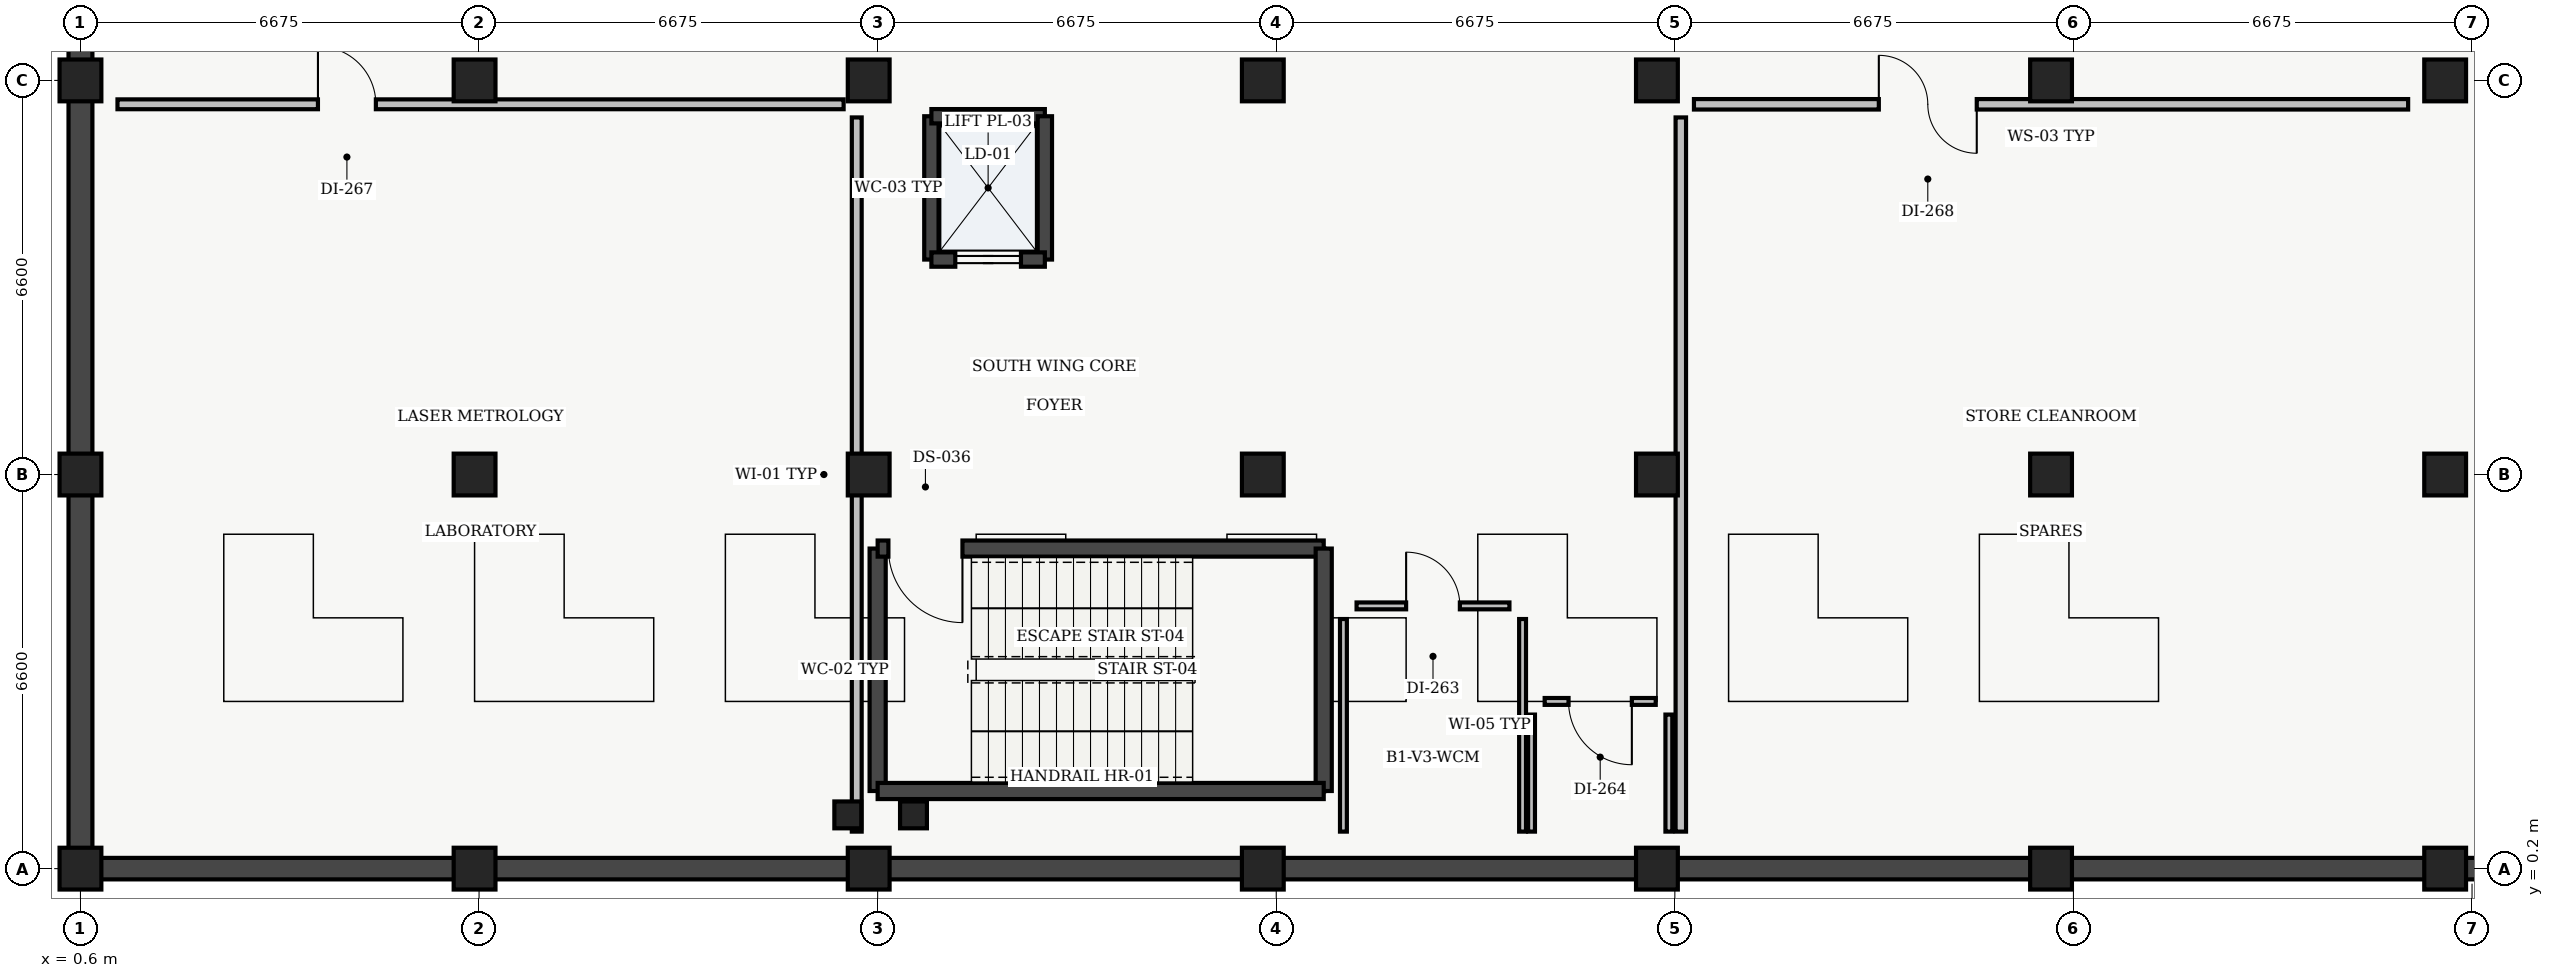
"""IFC4 building model, lengths in metres.
Left out: names, types, materials, properties, quantities, classifications, styles, units other than length and angle.
Written with IfcOpenShell. Run it as: python <this file> out.ifc"""

import sys

from ifc_helpers import new_model, si_unit, direction, frame, frame_2d, origin, origin_2d, place, context, subcontext, project, spatial, rectangle, extrude, element, fill, save


model = new_model("IFC4")
c1 = context("Model", 3, precision=1e-05, world=origin(), true_north=direction((0.0, 1.0)))
c2 = subcontext(c1, "Body", "Model", "MODEL_VIEW")
j1 = project(units=[si_unit("LENGTHUNIT", "METRE"), si_unit("PLANEANGLEUNIT", "RADIAN")], contexts=[c1])
p1 = place(None, origin())
s1 = spatial("IfcSite", under=j1, at=p1, CompositionType="ELEMENT")
p2 = place(p1, origin())
s2 = spatial("IfcBuilding", under=s1, at=p2, CompositionType="ELEMENT")
p3 = place(p2, frame((0.0, 0.0, -4.8)))
s3 = spatial("IfcBuildingStorey", under=s2, at=p3, CompositionType="ELEMENT", Elevation=-4.8)
for number, where, z_axis, x_axis in (
    (1, (0.6, 0.2, 0.0), (0.0, 0.0, 1.0), (1.0, 0.0, 0.0)),
    (2, (0.6, 6.8, 0.0), (0.0, 0.0, 1.0), (1.0, 0.0, 0.0)),
    (3, (0.6, 13.4, 0.0), (0.0, 0.0, 1.0), (1.0, 0.0, 0.0)),
    (4, (7.2, 0.2, 0.0), (0.0, 0.0, 1.0), (1.0, 0.0, 0.0)),
    (5, (7.2, 6.8, 0.0), (0.0, 0.0, 1.0), (1.0, 0.0, 0.0)),
    (6, (7.2, 13.4, 0.0), (0.0, 0.0, 1.0), (1.0, 0.0, 0.0)),
    (7, (13.8, 0.2, 0.0), (0.0, 0.0, 1.0), (1.0, 0.0, 0.0)),
    (8, (13.8, 6.8, 0.0), (0.0, 0.0, 1.0), (1.0, 0.0, 0.0)),
    (9, (13.8, 13.4, 0.0), (0.0, 0.0, 1.0), (1.0, 0.0, 0.0)),
    (10, (20.4, 0.2, 0.0), (0.0, 0.0, 1.0), (1.0, 0.0, 0.0)),
    (11, (20.4, 6.8, 0.0), (0.0, 0.0, 1.0), (1.0, 0.0, 0.0)),
    (12, (20.4, 13.4, 0.0), (0.0, 0.0, 1.0), (1.0, 0.0, 0.0)),
    (13, (27.0, 0.2, 0.0), (0.0, 0.0, 1.0), (1.0, 0.0, 0.0)),
    (14, (27.0, 6.8, 0.0), (0.0, 0.0, 1.0), (1.0, 0.0, 0.0)),
    (15, (27.0, 13.4, 0.0), (0.0, 0.0, 1.0), (1.0, 0.0, 0.0)),
    (16, (33.6, 0.2, 0.0), (0.0, 0.0, 1.0), (1.0, 0.0, 0.0)),
    (17, (33.6, 6.8, 0.0), (0.0, 0.0, 1.0), (1.0, 0.0, 0.0)),
    (18, (33.6, 13.4, 0.0), (0.0, 0.0, 1.0), (1.0, 0.0, 0.0)),
    (19, (40.2, 0.2, 0.0), (0.0, 0.0, 1.0), (1.0, 0.0, 0.0)),
    (20, (40.2, 6.8, 0.0), (0.0, 0.0, 1.0), (1.0, 0.0, 0.0)),
    (21, (40.2, 13.4, 0.0), (0.0, 0.0, 1.0), (1.0, 0.0, 0.0)),
):
    element("IfcColumn", number, at=place(p3, frame(where, z_axis=z_axis, x_axis=x_axis)), inside=s3, PredefinedType="COLUMN", context=c2, shape_type="SweptSolid", body=[
        extrude(rectangle(XDim=0.7, YDim=0.7, at=origin_2d()), origin(), (0.0, 0.0, 1.0), 4.6),
    ])
for number, where, z_axis, x_axis in (
    (22, (13.45, 1.1, 0.0), (0.0, 0.0, 1.0), (1.0, 0.0, 0.0)),
    (23, (14.55, 1.1, 0.0), (0.0, 0.0, 1.0), (1.0, 0.0, 0.0)),
):
    element("IfcColumn", number, at=place(p3, frame(where, z_axis=z_axis, x_axis=x_axis)), inside=s3, PredefinedType="COLUMN", context=c2, shape_type="SweptSolid", body=[
        extrude(rectangle(XDim=0.45, YDim=0.45, at=origin_2d()), origin(), (0.0, 0.0, 1.0), 4.74),
    ])
p4 = place(p3, frame((0.6, 0.2, 0.0), z_axis=(0.0, 0.0, 1.0), x_axis=(0.0, 1.0, 0.0)))
e24 = element("IfcWall", 24, at=p4, inside=s3, PredefinedType="USERDEFINED", context=c2, shape_type="SweptSolid", body=[
    extrude(rectangle(XDim=61.4, YDim=0.4, at=frame_2d((30.7, 0.0))), origin(), (0.0, 0.0, 1.0), 4.58),
])
p5 = place(p3, frame((160.8, 0.2, 0.0), z_axis=(0.0, 0.0, 1.0), x_axis=(-1.0, 0.0, 0.0)))
e25 = element("IfcWall", 25, at=p5, inside=s3, PredefinedType="USERDEFINED", context=c2, shape_type="SweptSolid", body=[
    extrude(rectangle(XDim=160.2, YDim=0.36, at=frame_2d((80.1, 0.0))), origin(), (0.0, 0.0, 1.0), 4.58),
])
p6 = place(p3, frame((13.95, 1.5, 0.0), z_axis=(0.0, 0.0, 1.0), x_axis=(0.0, 1.0, 0.0)))
e26 = element("IfcWall", 26, at=p6, inside=s3, PredefinedType="SHEAR", context=c2, shape_type="SweptSolid", body=[
    extrude(rectangle(XDim=4.06, YDim=0.27, at=frame_2d((2.03, 0.0))), origin(), (0.0, 0.0, 1.0), 4.58),
])
p7 = place(p3, frame((13.95, 5.56, 0.0), z_axis=(0.0, 0.0, 1.0), x_axis=(1.0, 0.0, 0.0)))
e27 = element("IfcWall", 27, at=p7, inside=s3, PredefinedType="SHEAR", context=c2, shape_type="SweptSolid", body=[
    extrude(rectangle(XDim=7.47, YDim=0.27, at=frame_2d((3.735, 0.0))), origin(), (0.0, 0.0, 1.0), 4.58),
])
p8 = place(p7, frame((0.18, 0.0, 0.0)))
e28 = element("IfcOpeningElement", 28, at=p8, cuts=e27, PredefinedType="OPENING", context=c2, shape_type="SweptSolid", body=[
    extrude(rectangle(XDim=1.24, YDim=2.15, at=frame_2d((0.62, 1.075))), frame((0.0, 0.135, 0.0), z_axis=(0.0, -1.0, 0.0), x_axis=(1.0, 0.0, 0.0)), (0.0, 0.0, 1.0), 0.27),
])
p9 = place(p3, frame((21.42, 5.56, 0.0), z_axis=(0.0, 0.0, 1.0), x_axis=(0.0, -1.0, 0.0)))
e29 = element("IfcWall", 29, at=p9, inside=s3, PredefinedType="SHEAR", context=c2, shape_type="SweptSolid", body=[
    extrude(rectangle(XDim=4.06, YDim=0.27, at=frame_2d((2.03, 0.0))), origin(), (0.0, 0.0, 1.0), 4.58),
])
p10 = place(p3, frame((21.42, 1.5, 0.0), z_axis=(0.0, 0.0, 1.0), x_axis=(-1.0, 0.0, 0.0)))
e30 = element("IfcWall", 30, at=p10, inside=s3, PredefinedType="SHEAR", context=c2, shape_type="SweptSolid", body=[
    extrude(rectangle(XDim=7.47, YDim=0.27, at=frame_2d((3.735, 0.0))), origin(), (0.0, 0.0, 1.0), 4.58),
])
p11 = place(p3, frame((14.85, 10.4, 0.0), z_axis=(0.0, 0.0, 1.0), x_axis=(0.0, 1.0, 0.0)))
e31 = element("IfcWall", 31, at=p11, inside=s3, PredefinedType="SHEAR", context=c2, shape_type="SweptSolid", body=[
    extrude(rectangle(XDim=2.4, YDim=0.24, at=frame_2d((1.2, 0.0))), origin(), (0.0, 0.0, 1.0), 4.58),
])
p12 = place(p3, frame((14.85, 12.8, 0.0), z_axis=(0.0, 0.0, 1.0), x_axis=(1.0, 0.0, 0.0)))
e32 = element("IfcWall", 32, at=p12, inside=s3, PredefinedType="SHEAR", context=c2, shape_type="SweptSolid", body=[
    extrude(rectangle(XDim=1.9, YDim=0.24, at=frame_2d((0.95, 0.0))), origin(), (0.0, 0.0, 1.0), 4.58),
])
p13 = place(p3, frame((16.75, 12.8, 0.0), z_axis=(0.0, 0.0, 1.0), x_axis=(0.0, -1.0, 0.0)))
e33 = element("IfcWall", 33, at=p13, inside=s3, PredefinedType="SHEAR", context=c2, shape_type="SweptSolid", body=[
    extrude(rectangle(XDim=2.4, YDim=0.24, at=frame_2d((1.2, 0.0))), origin(), (0.0, 0.0, 1.0), 4.58),
])
p14 = place(p3, frame((16.75, 10.4, 0.0), z_axis=(0.0, 0.0, 1.0), x_axis=(-1.0, 0.0, 0.0)))
e34 = element("IfcWall", 34, at=p14, inside=s3, PredefinedType="SHEAR", context=c2, shape_type="SweptSolid", body=[
    extrude(rectangle(XDim=1.9, YDim=0.24, at=frame_2d((0.95, 0.0))), origin(), (0.0, 0.0, 1.0), 4.58),
])
p15 = place(p14, frame((0.4, 0.0, 0.0)))
e35 = element("IfcOpeningElement", 35, at=p15, cuts=e34, PredefinedType="OPENING", context=c2, shape_type="SweptSolid", body=[
    extrude(rectangle(XDim=1.1, YDim=2.2, at=frame_2d((0.55, 1.1))), frame((0.0, 0.12, 0.0), z_axis=(0.0, -1.0, 0.0), x_axis=(1.0, 0.0, 0.0)), (0.0, 0.0, 1.0), 0.24),
])
p16 = place(p3, frame((24.75, 0.82, 0.0), z_axis=(0.0, 0.0, 1.0), x_axis=(0.0, 1.0, 0.0)))
e36 = element("IfcWall", 36, at=p16, inside=s3, PredefinedType="PARTITIONING", context=c2, shape_type="SweptSolid", body=[
    extrude(rectangle(XDim=3.56, YDim=0.115, at=frame_2d((1.78, 0.0))), origin(), (0.0, 0.0, 1.0), 4.25),
])
p17 = place(p3, frame((24.53, 4.6, 0.0), z_axis=(0.0, 0.0, 1.0), x_axis=(-1.0, 0.0, 0.0)))
e37 = element("IfcWall", 37, at=p17, inside=s3, PredefinedType="PARTITIONING", context=c2, shape_type="SweptSolid", body=[
    extrude(rectangle(XDim=2.56, YDim=0.115, at=frame_2d((1.28, 0.0))), origin(), (0.0, 0.0, 1.0), 4.25),
])
p18 = place(p17, frame((0.83, 0.0, 0.0)))
e38 = element("IfcOpeningElement", 38, at=p18, cuts=e37, PredefinedType="OPENING", context=c2, shape_type="SweptSolid", body=[
    extrude(rectangle(XDim=0.9, YDim=2.1, at=frame_2d((0.45, 1.05))), frame((0.0, 0.058, 0.0), z_axis=(0.0, -1.0, 0.0), x_axis=(1.0, 0.0, 0.0)), (0.0, 0.0, 1.0), 0.115),
])
p19 = place(p3, frame((21.75, 4.38, 0.0), z_axis=(0.0, 0.0, 1.0), x_axis=(0.0, -1.0, 0.0)))
e39 = element("IfcWall", 39, at=p19, inside=s3, PredefinedType="PARTITIONING", context=c2, shape_type="SweptSolid", body=[
    extrude(rectangle(XDim=3.56, YDim=0.115, at=frame_2d((1.78, 0.0))), origin(), (0.0, 0.0, 1.0), 4.25),
])
p20 = place(p3, frame((27.2, 0.82, 0.0), z_axis=(0.0, 0.0, 1.0), x_axis=(0.0, 1.0, 0.0)))
e40 = element("IfcWall", 40, at=p20, inside=s3, PredefinedType="PARTITIONING", context=c2, shape_type="SweptSolid", body=[
    extrude(rectangle(XDim=1.96, YDim=0.115, at=frame_2d((0.98, 0.0))), origin(), (0.0, 0.0, 1.0), 3.935),
])
p21 = place(p3, frame((26.98, 3.0, 0.0), z_axis=(0.0, 0.0, 1.0), x_axis=(-1.0, 0.0, 0.0)))
e41 = element("IfcWall", 41, at=p21, inside=s3, PredefinedType="PARTITIONING", context=c2, shape_type="SweptSolid", body=[
    extrude(rectangle(XDim=1.86, YDim=0.115, at=frame_2d((0.93, 0.0))), origin(), (0.0, 0.0, 1.0), 4.25),
])
p22 = place(p21, frame((0.4, 0.0, 0.0)))
e42 = element("IfcOpeningElement", 42, at=p22, cuts=e41, PredefinedType="OPENING", context=c2, shape_type="SweptSolid", body=[
    extrude(rectangle(XDim=1.06, YDim=2.12, at=frame_2d((0.53, 1.06))), frame((0.0, 0.058, 0.0), z_axis=(0.0, -1.0, 0.0), x_axis=(1.0, 0.0, 0.0)), (0.0, 0.0, 1.0), 0.115),
])
p23 = place(p3, frame((24.9, 2.78, 0.0), z_axis=(0.0, 0.0, 1.0), x_axis=(0.0, -1.0, 0.0)))
e43 = element("IfcWall", 43, at=p23, inside=s3, PredefinedType="PARTITIONING", context=c2, shape_type="SweptSolid", body=[
    extrude(rectangle(XDim=1.96, YDim=0.115, at=frame_2d((0.98, 0.0))), origin(), (0.0, 0.0, 1.0), 4.25),
])
p24 = place(p3, frame((13.6, 0.82, 0.0), z_axis=(0.0, 0.0, 1.0), x_axis=(0.0, 1.0, 0.0)))
e44 = element("IfcWall", 44, at=p24, inside=s3, PredefinedType="PARTITIONING", context=c2, shape_type="SweptSolid", body=[
    extrude(rectangle(XDim=11.96, YDim=0.165, at=frame_2d((5.98, 0.0))), origin(), (0.0, 0.0, 1.0), 3.935),
])
p25 = place(p3, frame((13.38, 13.0, 0.0), z_axis=(0.0, 0.0, 1.0), x_axis=(-1.0, 0.0, 0.0)))
e45 = element("IfcWall", 45, at=p25, inside=s3, PredefinedType="PARTITIONING", context=c2, shape_type="SweptSolid", body=[
    extrude(rectangle(XDim=12.16, YDim=0.165, at=frame_2d((6.08, 0.0))), origin(), (0.0, 0.0, 1.0), 4.25),
])
p26 = place(p25, frame((7.833, 0.0, 0.0)))
e46 = element("IfcOpeningElement", 46, at=p26, cuts=e45, PredefinedType="OPENING", context=c2, shape_type="SweptSolid", body=[
    extrude(rectangle(XDim=0.97, YDim=2.12, at=frame_2d((0.485, 1.06))), frame((0.0, 0.083, 0.0), z_axis=(0.0, -1.0, 0.0), x_axis=(1.0, 0.0, 0.0)), (0.0, 0.0, 1.0), 0.165),
])
p27 = place(p3, frame((39.58, 13.0, 0.0), z_axis=(0.0, 0.0, 1.0), x_axis=(-1.0, 0.0, 0.0)))
e47 = element("IfcWall", 47, at=p27, inside=s3, PredefinedType="SOLIDWALL", context=c2, shape_type="SweptSolid", body=[
    extrude(rectangle(XDim=11.96, YDim=0.175, at=frame_2d((5.98, 0.0))), origin(), (0.0, 0.0, 1.0), 4.25),
])
p28 = place(p27, frame((7.224, 0.0, 0.0)))
e48 = element("IfcOpeningElement", 48, at=p28, cuts=e47, PredefinedType="OPENING", context=c2, shape_type="SweptSolid", body=[
    extrude(rectangle(XDim=1.64, YDim=2.2, at=frame_2d((0.82, 1.1))), frame((0.0, 0.087, 0.0), z_axis=(0.0, -1.0, 0.0), x_axis=(1.0, 0.0, 0.0)), (0.0, 0.0, 1.0), 0.175),
])
p29 = place(p3, frame((27.4, 12.78, 0.0), z_axis=(0.0, 0.0, 1.0), x_axis=(0.0, -1.0, 0.0)))
e49 = element("IfcWall", 49, at=p29, inside=s3, PredefinedType="SOLIDWALL", context=c2, shape_type="SweptSolid", body=[
    extrude(rectangle(XDim=11.96, YDim=0.175, at=frame_2d((5.98, 0.0))), origin(), (0.0, 0.0, 1.0), 4.25),
])
p30 = place(p8, origin())
e50 = element("IfcDoor", 50, at=p30, inside=s3, OperationType="SINGLE_SWING_RIGHT", PredefinedType="DOOR", context=c2, shape_type="SweptSolid", body=[
    extrude(rectangle(XDim=1.24, YDim=2.15, at=frame_2d((0.62, 1.075))), frame((0.0, 0.025, 0.0), z_axis=(0.0, -1.0, 0.0), x_axis=(1.0, 0.0, 0.0)), (0.0, 0.0, 1.0), 0.05),
])
fill(e28, e50)
p31 = place(p15, origin())
e51 = element("IfcDoor", 51, at=p31, inside=s3, OperationType="SLIDING_TO_LEFT", PredefinedType="DOOR", context=c2, shape_type="SweptSolid", body=[
    extrude(rectangle(XDim=1.1, YDim=2.2, at=frame_2d((0.55, 1.1))), frame((0.0, 0.025, 0.0), z_axis=(0.0, -1.0, 0.0), x_axis=(1.0, 0.0, 0.0)), (0.0, 0.0, 1.0), 0.05),
])
fill(e35, e51)
p32 = place(p18, origin())
e52 = element("IfcDoor", 52, at=p32, inside=s3, OperationType="SINGLE_SWING_RIGHT", PredefinedType="DOOR", context=c2, shape_type="SweptSolid", body=[
    extrude(rectangle(XDim=0.9, YDim=2.1, at=frame_2d((0.45, 1.05))), frame((0.0, 0.025, 0.0), z_axis=(0.0, -1.0, 0.0), x_axis=(1.0, 0.0, 0.0)), (0.0, 0.0, 1.0), 0.05),
])
fill(e38, e52)
p33 = place(p22, origin())
e53 = element("IfcDoor", 53, at=p33, inside=s3, OperationType="SINGLE_SWING_LEFT", PredefinedType="DOOR", context=c2, shape_type="SweptSolid", body=[
    extrude(rectangle(XDim=1.06, YDim=2.12, at=frame_2d((0.53, 1.06))), frame((0.0, 0.025, 0.0), z_axis=(0.0, -1.0, 0.0), x_axis=(1.0, 0.0, 0.0)), (0.0, 0.0, 1.0), 0.05),
])
fill(e42, e53)
p34 = place(p26, origin())
e54 = element("IfcDoor", 54, at=p34, inside=s3, OperationType="SINGLE_SWING_RIGHT", PredefinedType="DOOR", context=c2, shape_type="SweptSolid", body=[
    extrude(rectangle(XDim=0.97, YDim=2.12, at=frame_2d((0.485, 1.06))), frame((0.0, 0.025, 0.0), z_axis=(0.0, -1.0, 0.0), x_axis=(1.0, 0.0, 0.0)), (0.0, 0.0, 1.0), 0.05),
])
fill(e46, e54)
p35 = place(p28, origin())
e55 = element("IfcDoor", 55, at=p35, inside=s3, OperationType="DOUBLE_DOOR_SINGLE_SWING", PredefinedType="DOOR", context=c2, shape_type="SweptSolid", body=[
    extrude(rectangle(XDim=1.64, YDim=2.2, at=frame_2d((0.82, 1.1))), frame((0.0, 0.025, 0.0), z_axis=(0.0, -1.0, 0.0), x_axis=(1.0, 0.0, 0.0)), (0.0, 0.0, 1.0), 0.05),
])
fill(e48, e55)
save(model, sys.argv[1])
